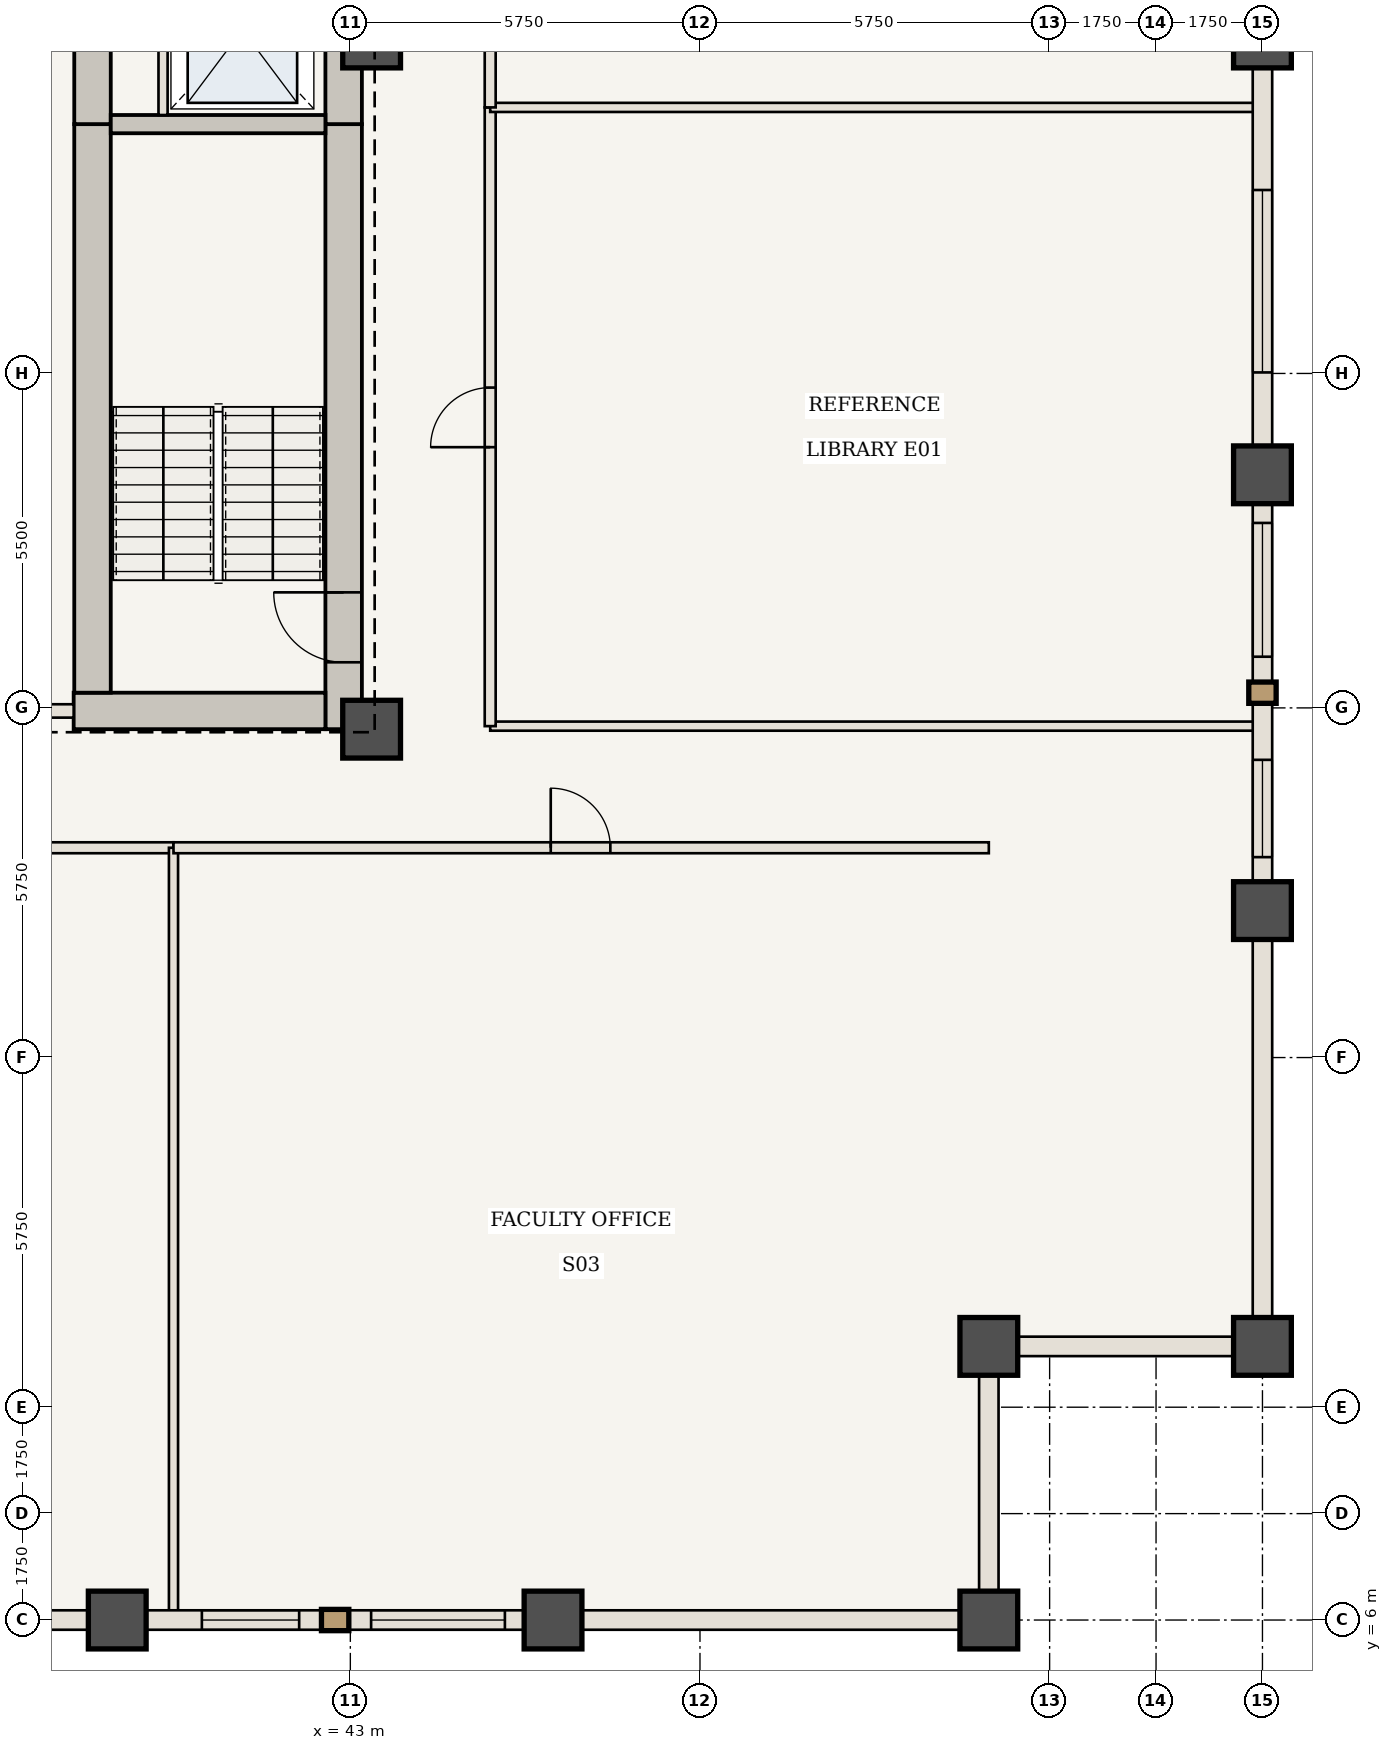
"""IFC4 building model, lengths in metres.
Left out: names, types, materials, properties, quantities, classifications, styles, units other than length and angle.
Written with IfcOpenShell. Run it as: python <this file> out.ifc"""

import sys

from ifc_helpers import new_model, si_unit, direction, frame, frame_2d, origin, origin_2d, place, context, subcontext, project, spatial, rectangle, extrude, element, fill, save


model = new_model("IFC4")
c1 = context("Model", 3, precision=1e-05, world=origin(), true_north=direction((0.0, 1.0)))
c2 = subcontext(c1, "Body", "Model", "MODEL_VIEW")
j1 = project(units=[si_unit("LENGTHUNIT", "METRE"), si_unit("PLANEANGLEUNIT", "RADIAN")], contexts=[c1])
p1 = place(None, origin())
s1 = spatial("IfcSite", under=j1, at=p1, CompositionType="ELEMENT")
p2 = place(p1, origin())
s2 = spatial("IfcBuilding", under=s1, at=p2, CompositionType="ELEMENT")
p3 = place(p2, frame((0.0, 0.0, 137.55)))
s3 = spatial("IfcBuildingStorey", under=s2, at=p3, CompositionType="ELEMENT", Elevation=137.55)
p4 = place(p3, frame((42.89, 20.65, 0.0), z_axis=(0.0, 0.0, 1.0), x_axis=(0.0, 1.0, 0.0)))
e1 = element("IfcWall", 1, at=p4, inside=s3, PredefinedType="SHEAR", context=c2, shape_type="SweptSolid", body=[
    extrude(rectangle(XDim=9.95, YDim=0.6, at=frame_2d((4.975, 0.0))), origin(), (0.0, 0.0, 1.0), 3.85),
])
p5 = place(p4, frame((1.1, 0.0, 0.0)))
e2 = element("IfcOpeningElement", 2, at=p5, cuts=e1, PredefinedType="OPENING", context=c2, shape_type="SweptSolid", body=[
    extrude(rectangle(XDim=1.15, YDim=2.15, at=frame_2d((0.575, 1.075))), frame((0.0, 0.31, 0.0), z_axis=(0.0, -1.0, 0.0), x_axis=(1.0, 0.0, 0.0)), (0.0, 0.0, 1.0), 0.62),
])
p6 = place(p3, frame((42.89, 30.6, 0.0), z_axis=(0.0, 0.0, 1.0), x_axis=(0.0, 1.0, 0.0)))
e3 = element("IfcWall", 3, at=p6, inside=s3, PredefinedType="SHEAR", context=c2, shape_type="SweptSolid", body=[
    extrude(rectangle(XDim=12.7, YDim=0.6, at=frame_2d((6.35, 0.0))), origin(), (0.0, 0.0, 1.0), 3.85),
])
p7 = place(p6, frame((4.2, 0.0, 0.0)))
e4 = element("IfcOpeningElement", 4, at=p7, cuts=e3, PredefinedType="OPENING", context=c2, shape_type="SweptSolid", body=[
    extrude(rectangle(XDim=1.1, YDim=2.15, at=frame_2d((0.55, 1.075))), frame((0.0, 0.31, 0.0), z_axis=(0.0, -1.0, 0.0), x_axis=(1.0, 0.0, 0.0)), (0.0, 0.0, 1.0), 0.62),
])
p8 = place(p6, frame((8.4, 0.0, 0.0)))
e5 = element("IfcOpeningElement", 5, at=p8, cuts=e3, PredefinedType="OPENING", context=c2, shape_type="SweptSolid", body=[
    extrude(rectangle(XDim=0.88, YDim=2.1, at=frame_2d((0.44, 1.05))), frame((0.0, 0.31, 0.0), z_axis=(0.0, -1.0, 0.0), x_axis=(1.0, 0.0, 0.0)), (0.0, 0.0, 1.0), 0.62),
])
p9 = place(p6, frame((10.5, 0.0, 0.0)))
e6 = element("IfcOpeningElement", 6, at=p9, cuts=e3, PredefinedType="OPENING", context=c2, shape_type="SweptSolid", body=[
    extrude(rectangle(XDim=0.88, YDim=2.1, at=frame_2d((0.44, 1.05))), frame((0.0, 0.31, 0.0), z_axis=(0.0, -1.0, 0.0), x_axis=(1.0, 0.0, 0.0)), (0.0, 0.0, 1.0), 0.62),
])
p10 = place(p3, frame((38.45, 20.95, 0.0), z_axis=(0.0, 0.0, 1.0), x_axis=(1.0, 0.0, 0.0)))
e7 = element("IfcWall", 7, at=p10, inside=s3, PredefinedType="SHEAR", context=c2, shape_type="SweptSolid", body=[
    extrude(rectangle(XDim=4.14, YDim=0.6, at=frame_2d((2.07, 0.0))), origin(), (0.0, 0.0, 1.0), 3.85),
])
p11 = place(p3, frame((38.76, 21.25, 0.0), z_axis=(0.0, 0.0, 1.0), x_axis=(0.0, 1.0, 0.0)))
e8 = element("IfcWall", 8, at=p11, inside=s3, PredefinedType="SHEAR", context=c2, shape_type="SweptSolid", body=[
    extrude(rectangle(XDim=9.35, YDim=0.6, at=frame_2d((4.675, 0.0))), origin(), (0.0, 0.0, 1.0), 3.85),
])
p12 = place(p3, frame((38.76, 30.6, 0.0), z_axis=(0.0, 0.0, 1.0), x_axis=(0.0, 1.0, 0.0)))
e9 = element("IfcWall", 9, at=p12, inside=s3, PredefinedType="SHEAR", context=c2, shape_type="SweptSolid", body=[
    extrude(rectangle(XDim=12.1, YDim=0.6, at=frame_2d((6.05, 0.0))), origin(), (0.0, 0.0, 1.0), 3.85),
])
for number, where, z_axis, x_axis in (
    (10, (43.35, 20.65, 0.0), (0.0, 0.0, 1.0), (1.0, 0.0, 0.0)),
    (11, (43.35, 32.0, 0.0), (0.0, 0.0, 1.0), (1.0, 0.0, 0.0)),
    (12, (53.5, 6.0, 0.0), (0.0, 0.0, 1.0), (1.0, 0.0, 0.0)),
    (13, (53.5, 10.5, 0.0), (0.0, 0.0, 1.0), (1.0, 0.0, 0.0)),
    (14, (58.0, 10.5, 0.0), (0.0, 0.0, 1.0), (1.0, 0.0, 0.0)),
    (15, (58.0, 17.667, 0.0), (0.0, 0.0, 1.0), (1.0, 0.0, 0.0)),
    (16, (58.0, 24.833, 0.0), (0.0, 0.0, 1.0), (1.0, 0.0, 0.0)),
    (17, (58.0, 32.0, 0.0), (0.0, 0.0, 1.0), (1.0, 0.0, 0.0)),
    (18, (39.167, 6.0, 0.0), (0.0, 0.0, 1.0), (1.0, 0.0, 0.0)),
    (19, (46.333, 6.0, 0.0), (0.0, 0.0, 1.0), (1.0, 0.0, 0.0)),
):
    element("IfcColumn", number, at=place(p3, frame(where, z_axis=z_axis, x_axis=x_axis)), inside=s3, PredefinedType="COLUMN", context=c2, shape_type="SweptSolid", body=[
        extrude(rectangle(XDim=0.95, YDim=0.95, at=origin_2d()), origin(), (0.0, 0.0, 1.0), 3.85),
    ])
p13 = place(p3, frame((39.06, 30.6, 0.0), z_axis=(0.0, 0.0, 1.0), x_axis=(1.0, 0.0, 0.0)))
e20 = element("IfcWall", 20, at=p13, inside=s3, PredefinedType="SHEAR", context=c2, shape_type="SweptSolid", body=[
    extrude(rectangle(XDim=3.53, YDim=0.3, at=frame_2d((1.765, 0.0))), origin(), (0.0, 0.0, 1.0), 3.685),
])
p14 = place(p3, frame((39.92, 30.75, 0.0), z_axis=(0.0, 0.0, 1.0), x_axis=(0.0, 1.0, 0.0)))
e21 = element("IfcWall", 21, at=p14, inside=s3, PredefinedType="STANDARD", context=c2, shape_type="SweptSolid", body=[
    extrude(rectangle(XDim=2.65, YDim=0.15, at=frame_2d((1.325, 0.0))), origin(), (0.0, 0.0, 1.0), 3.685),
])
p15 = place(p3, frame((35.15, 20.95, 0.0), z_axis=(0.0, 0.0, 1.0), x_axis=(1.0, 0.0, 0.0)))
e22 = element("IfcWall", 22, at=p15, inside=s3, PredefinedType="STANDARD", context=c2, shape_type="SweptSolid", body=[
    extrude(rectangle(XDim=3.3, YDim=0.22, at=frame_2d((1.65, 0.0))), origin(), (0.0, 0.0, 1.0), 3.685),
])
p16 = place(p15, frame((1.1, 0.0, 0.0)))
e23 = element("IfcOpeningElement", 23, at=p16, cuts=e22, PredefinedType="OPENING", context=c2, shape_type="SweptSolid", body=[
    extrude(rectangle(XDim=1.1, YDim=2.15, at=frame_2d((0.55, 1.075))), frame((0.0, 0.12, 0.0), z_axis=(0.0, -1.0, 0.0), x_axis=(1.0, 0.0, 0.0)), (0.0, 0.0, 1.0), 0.24),
])
p17 = place(p3, frame((24.058, 18.7, 0.0), z_axis=(0.0, 0.0, 1.0), x_axis=(1.0, 0.0, 0.0)))
e24 = element("IfcWall", 24, at=p17, inside=s3, PredefinedType="STANDARD", context=c2, shape_type="SweptSolid", body=[
    extrude(rectangle(XDim=16.033, YDim=0.18, at=frame_2d((8.017, 0.0))), origin(), (0.0, 0.0, 1.0), 3.685),
])
p18 = place(p17, frame((8.967, 0.0, 0.0)))
e25 = element("IfcOpeningElement", 25, at=p18, cuts=e24, PredefinedType="OPENING", context=c2, shape_type="SweptSolid", body=[
    extrude(rectangle(XDim=0.98, YDim=2.2, at=frame_2d((0.49, 1.1))), frame((0.0, 0.1, 0.0), z_axis=(0.0, -1.0, 0.0), x_axis=(1.0, 0.0, 0.0)), (0.0, 0.0, 1.0), 0.2),
])
p19 = place(p3, frame((40.092, 6.06, 0.0), z_axis=(0.0, 0.0, 1.0), x_axis=(0.0, 1.0, 0.0)))
e26 = element("IfcWall", 26, at=p19, inside=s3, PredefinedType="STANDARD", context=c2, shape_type="SweptSolid", body=[
    extrude(rectangle(XDim=12.64, YDim=0.15, at=frame_2d((6.32, 0.0))), origin(), (0.0, 0.0, 1.0), 3.685),
])
p20 = place(p3, frame((40.092, 18.7, 0.0), z_axis=(0.0, 0.0, 1.0), x_axis=(1.0, 0.0, 0.0)))
e27 = element("IfcWall", 27, at=p20, inside=s3, PredefinedType="STANDARD", context=c2, shape_type="SweptSolid", body=[
    extrude(rectangle(XDim=13.408, YDim=0.18, at=frame_2d((6.704, 0.0))), origin(), (0.0, 0.0, 1.0), 3.685),
])
p21 = place(p20, frame((6.204, 0.0, 0.0)))
e28 = element("IfcOpeningElement", 28, at=p21, cuts=e27, PredefinedType="OPENING", context=c2, shape_type="SweptSolid", body=[
    extrude(rectangle(XDim=0.98, YDim=2.2, at=frame_2d((0.49, 1.1))), frame((0.0, 0.1, 0.0), z_axis=(0.0, -1.0, 0.0), x_axis=(1.0, 0.0, 0.0)), (0.0, 0.0, 1.0), 0.2),
])
p22 = place(p3, frame((45.3, 20.7, 0.0), z_axis=(0.0, 0.0, 1.0), x_axis=(1.0, 0.0, 0.0)))
e29 = element("IfcWall", 29, at=p22, inside=s3, PredefinedType="STANDARD", context=c2, shape_type="SweptSolid", body=[
    extrude(rectangle(XDim=12.64, YDim=0.15, at=frame_2d((6.32, 0.0))), origin(), (0.0, 0.0, 1.0), 3.065),
])
p23 = place(p3, frame((45.3, 20.7, 0.0), z_axis=(0.0, 0.0, 1.0), x_axis=(0.0, 1.0, 0.0)))
e30 = element("IfcWall", 30, at=p23, inside=s3, PredefinedType="STANDARD", context=c2, shape_type="SweptSolid", body=[
    extrude(rectangle(XDim=10.175, YDim=0.18, at=frame_2d((5.087, 0.0))), origin(), (0.0, 0.0, 1.0), 3.685),
])
p24 = place(p23, frame((4.587, 0.0, 0.0)))
e31 = element("IfcOpeningElement", 31, at=p24, cuts=e30, PredefinedType="OPENING", context=c2, shape_type="SweptSolid", body=[
    extrude(rectangle(XDim=0.98, YDim=2.2, at=frame_2d((0.49, 1.1))), frame((0.0, 0.1, 0.0), z_axis=(0.0, -1.0, 0.0), x_axis=(1.0, 0.0, 0.0)), (0.0, 0.0, 1.0), 0.2),
])
p25 = place(p3, frame((45.3, 30.875, 0.0), z_axis=(0.0, 0.0, 1.0), x_axis=(1.0, 0.0, 0.0)))
e32 = element("IfcWall", 32, at=p25, inside=s3, PredefinedType="STANDARD", context=c2, shape_type="SweptSolid", body=[
    extrude(rectangle(XDim=12.64, YDim=0.15, at=frame_2d((6.32, 0.0))), origin(), (0.0, 0.0, 1.0), 3.685),
])
p26 = place(p3, frame((45.3, 30.875, 0.0), z_axis=(0.0, 0.0, 1.0), x_axis=(0.0, 1.0, 0.0)))
e33 = element("IfcWall", 33, at=p26, inside=s3, PredefinedType="STANDARD", context=c2, shape_type="SweptSolid", body=[
    extrude(rectangle(XDim=12.425, YDim=0.18, at=frame_2d((6.212, 0.0))), origin(), (0.0, 0.0, 1.0), 3.685),
])
p27 = place(p26, frame((5.712, 0.0, 0.0)))
e34 = element("IfcOpeningElement", 34, at=p27, cuts=e33, PredefinedType="OPENING", context=c2, shape_type="SweptSolid", body=[
    extrude(rectangle(XDim=0.98, YDim=2.2, at=frame_2d((0.49, 1.1))), frame((0.0, 0.1, 0.0), z_axis=(0.0, -1.0, 0.0), x_axis=(1.0, 0.0, 0.0)), (0.0, 0.0, 1.0), 0.2),
])
p28 = place(p3, frame((39.167, 6.0, 0.0), z_axis=(0.0, 0.0, 1.0), x_axis=(-1.0, 0.0, 0.0)))
e35 = element("IfcWall", 35, at=p28, inside=s3, PredefinedType="USERDEFINED", context=c2, shape_type="SweptSolid", body=[
    extrude(rectangle(XDim=7.167, YDim=0.32, at=frame_2d((3.583, 0.0))), origin(), (0.0, 0.0, 1.0), 2.885),
])
p29 = place(p28, frame((2.083, 0.0, 0.85)))
e36 = element("IfcOpeningElement", 36, at=p29, cuts=e35, PredefinedType="OPENING", context=c2, shape_type="SweptSolid", body=[
    extrude(rectangle(XDim=3.0, YDim=1.835, at=frame_2d((1.5, 0.917))), frame((0.0, 0.17, 0.0), z_axis=(0.0, -1.0, 0.0), x_axis=(1.0, 0.0, 0.0)), (0.0, 0.0, 1.0), 0.34),
])
p30 = place(p3, frame((46.333, 6.0, 0.0), z_axis=(0.0, 0.0, 1.0), x_axis=(-1.0, 0.0, 0.0)))
e37 = element("IfcWall", 37, at=p30, inside=s3, PredefinedType="USERDEFINED", context=c2, shape_type="SweptSolid", body=[
    extrude(rectangle(XDim=7.167, YDim=0.32, at=frame_2d((3.583, 0.0))), origin(), (0.0, 0.0, 1.0), 2.885),
])
p31 = place(p30, frame((0.792, 0.0, 0.85)))
e38 = element("IfcOpeningElement", 38, at=p31, cuts=e37, PredefinedType="OPENING", context=c2, shape_type="SweptSolid", body=[
    extrude(rectangle(XDim=2.2, YDim=1.835, at=frame_2d((1.1, 0.917))), frame((0.0, 0.17, 0.0), z_axis=(0.0, -1.0, 0.0), x_axis=(1.0, 0.0, 0.0)), (0.0, 0.0, 1.0), 0.34),
])
p32 = place(p30, frame((4.175, 0.0, 0.85)))
e39 = element("IfcOpeningElement", 39, at=p32, cuts=e37, PredefinedType="OPENING", context=c2, shape_type="SweptSolid", body=[
    extrude(rectangle(XDim=1.6, YDim=1.835, at=frame_2d((0.8, 0.917))), frame((0.0, 0.17, 0.0), z_axis=(0.0, -1.0, 0.0), x_axis=(1.0, 0.0, 0.0)), (0.0, 0.0, 1.0), 0.34),
])
for number, where, z_axis, x_axis in (
    (40, (53.5, 6.0, 0.0), (0.0, 0.0, 1.0), (-1.0, 0.0, 0.0)),
    (41, (58.0, 17.667, 0.0), (0.0, 0.0, 1.0), (0.0, -1.0, 0.0)),
):
    element("IfcWall", number, at=place(p3, frame(where, z_axis=z_axis, x_axis=x_axis)), inside=s3, PredefinedType="USERDEFINED", context=c2, shape_type="SweptSolid", body=[
        extrude(rectangle(XDim=7.167, YDim=0.32, at=frame_2d((3.583, 0.0))), origin(), (0.0, 0.0, 1.0), 2.885),
    ])
p33 = place(p3, frame((58.0, 24.833, 0.0), z_axis=(0.0, 0.0, 1.0), x_axis=(0.0, -1.0, 0.0)))
e42 = element("IfcWall", 42, at=p33, inside=s3, PredefinedType="USERDEFINED", context=c2, shape_type="SweptSolid", body=[
    extrude(rectangle(XDim=7.167, YDim=0.32, at=frame_2d((3.583, 0.0))), origin(), (0.0, 0.0, 1.0), 2.885),
])
p34 = place(p33, frame((0.792, 0.0, 0.85)))
e43 = element("IfcOpeningElement", 43, at=p34, cuts=e42, PredefinedType="OPENING", context=c2, shape_type="SweptSolid", body=[
    extrude(rectangle(XDim=2.2, YDim=1.835, at=frame_2d((1.1, 0.917))), frame((0.0, 0.17, 0.0), z_axis=(0.0, -1.0, 0.0), x_axis=(1.0, 0.0, 0.0)), (0.0, 0.0, 1.0), 0.34),
])
p35 = place(p33, frame((4.688, 0.0, 0.85)))
e44 = element("IfcOpeningElement", 44, at=p35, cuts=e42, PredefinedType="OPENING", context=c2, shape_type="SweptSolid", body=[
    extrude(rectangle(XDim=1.6, YDim=1.835, at=frame_2d((0.8, 0.917))), frame((0.0, 0.17, 0.0), z_axis=(0.0, -1.0, 0.0), x_axis=(1.0, 0.0, 0.0)), (0.0, 0.0, 1.0), 0.34),
])
p36 = place(p3, frame((58.0, 32.0, 0.0), z_axis=(0.0, 0.0, 1.0), x_axis=(0.0, -1.0, 0.0)))
e45 = element("IfcWall", 45, at=p36, inside=s3, PredefinedType="USERDEFINED", context=c2, shape_type="SweptSolid", body=[
    extrude(rectangle(XDim=7.167, YDim=0.32, at=frame_2d((3.583, 0.0))), origin(), (0.0, 0.0, 1.0), 2.885),
])
p37 = place(p36, frame((2.483, 0.0, 0.85)))
e46 = element("IfcOpeningElement", 46, at=p37, cuts=e45, PredefinedType="OPENING", context=c2, shape_type="SweptSolid", body=[
    extrude(rectangle(XDim=3.0, YDim=1.835, at=frame_2d((1.5, 0.917))), frame((0.0, 0.17, 0.0), z_axis=(0.0, -1.0, 0.0), x_axis=(1.0, 0.0, 0.0)), (0.0, 0.0, 1.0), 0.34),
])
for number, where, z_axis, x_axis in (
    (47, (53.5, 10.5, 0.0), (0.0, 0.0, 1.0), (0.0, -1.0, 0.0)),
    (48, (58.0, 10.5, 0.0), (0.0, 0.0, 1.0), (-1.0, 0.0, 0.0)),
):
    element("IfcWall", number, at=place(p3, frame(where, z_axis=z_axis, x_axis=x_axis)), inside=s3, PredefinedType="USERDEFINED", context=c2, shape_type="SweptSolid", body=[
        extrude(rectangle(XDim=4.5, YDim=0.32, at=frame_2d((2.25, 0.0))), origin(), (0.0, 0.0, 1.0), 2.885),
    ])
p38 = place(p5, origin())
e49 = element("IfcDoor", 49, at=p38, inside=s3, OperationType="SINGLE_SWING_RIGHT", PredefinedType="DOOR", context=c2, shape_type="SweptSolid", body=[
    extrude(rectangle(XDim=1.15, YDim=2.15, at=frame_2d((0.575, 1.075))), frame((0.0, 0.025, 0.0), z_axis=(0.0, -1.0, 0.0), x_axis=(1.0, 0.0, 0.0)), (0.0, 0.0, 1.0), 0.05),
])
fill(e2, e49)
p39 = place(p21, origin())
e50 = element("IfcDoor", 50, at=p39, inside=s3, OperationType="SINGLE_SWING_LEFT", PredefinedType="DOOR", context=c2, shape_type="SweptSolid", body=[
    extrude(rectangle(XDim=0.98, YDim=2.2, at=frame_2d((0.49, 1.1))), frame((0.0, 0.025, 0.0), z_axis=(0.0, -1.0, 0.0), x_axis=(1.0, 0.0, 0.0)), (0.0, 0.0, 1.0), 0.05),
])
fill(e28, e50)
p40 = place(p24, origin())
e51 = element("IfcDoor", 51, at=p40, inside=s3, OperationType="SINGLE_SWING_LEFT", PredefinedType="DOOR", context=c2, shape_type="SweptSolid", body=[
    extrude(rectangle(XDim=0.98, YDim=2.2, at=frame_2d((0.49, 1.1))), frame((0.0, 0.025, 0.0), z_axis=(0.0, -1.0, 0.0), x_axis=(1.0, 0.0, 0.0)), (0.0, 0.0, 1.0), 0.05),
])
fill(e31, e51)
p41 = place(p31, origin())
e52 = element("IfcWindow", 52, at=p41, inside=s3, PartitioningType="SINGLE_PANEL", PredefinedType="WINDOW", context=c2, shape_type="SweptSolid", body=[
    extrude(rectangle(XDim=2.2, YDim=1.835, at=frame_2d((1.1, 0.917))), frame((0.0, 0.03, 0.0), z_axis=(0.0, -1.0, 0.0), x_axis=(1.0, 0.0, 0.0)), (0.0, 0.0, 1.0), 0.06),
])
fill(e38, e52)
p42 = place(p32, origin())
e53 = element("IfcWindow", 53, at=p42, inside=s3, PartitioningType="SINGLE_PANEL", PredefinedType="WINDOW", context=c2, shape_type="SweptSolid", body=[
    extrude(rectangle(XDim=1.6, YDim=1.835, at=frame_2d((0.8, 0.917))), frame((0.0, 0.03, 0.0), z_axis=(0.0, -1.0, 0.0), x_axis=(1.0, 0.0, 0.0)), (0.0, 0.0, 1.0), 0.06),
])
fill(e39, e53)
p43 = place(p34, origin())
e54 = element("IfcWindow", 54, at=p43, inside=s3, PartitioningType="SINGLE_PANEL", PredefinedType="WINDOW", context=c2, shape_type="SweptSolid", body=[
    extrude(rectangle(XDim=2.2, YDim=1.835, at=frame_2d((1.1, 0.917))), frame((0.0, 0.03, 0.0), z_axis=(0.0, -1.0, 0.0), x_axis=(1.0, 0.0, 0.0)), (0.0, 0.0, 1.0), 0.06),
])
fill(e43, e54)
p44 = place(p35, origin())
e55 = element("IfcWindow", 55, at=p44, inside=s3, PartitioningType="SINGLE_PANEL", PredefinedType="WINDOW", context=c2, shape_type="SweptSolid", body=[
    extrude(rectangle(XDim=1.6, YDim=1.835, at=frame_2d((0.8, 0.917))), frame((0.0, 0.03, 0.0), z_axis=(0.0, -1.0, 0.0), x_axis=(1.0, 0.0, 0.0)), (0.0, 0.0, 1.0), 0.06),
])
fill(e44, e55)
p45 = place(p37, origin())
e56 = element("IfcWindow", 56, at=p45, inside=s3, PartitioningType="SINGLE_PANEL", PredefinedType="WINDOW", context=c2, shape_type="SweptSolid", body=[
    extrude(rectangle(XDim=3.0, YDim=1.835, at=frame_2d((1.5, 0.917))), frame((0.0, 0.03, 0.0), z_axis=(0.0, -1.0, 0.0), x_axis=(1.0, 0.0, 0.0)), (0.0, 0.0, 1.0), 0.06),
])
fill(e46, e56)
save(model, sys.argv[1])
